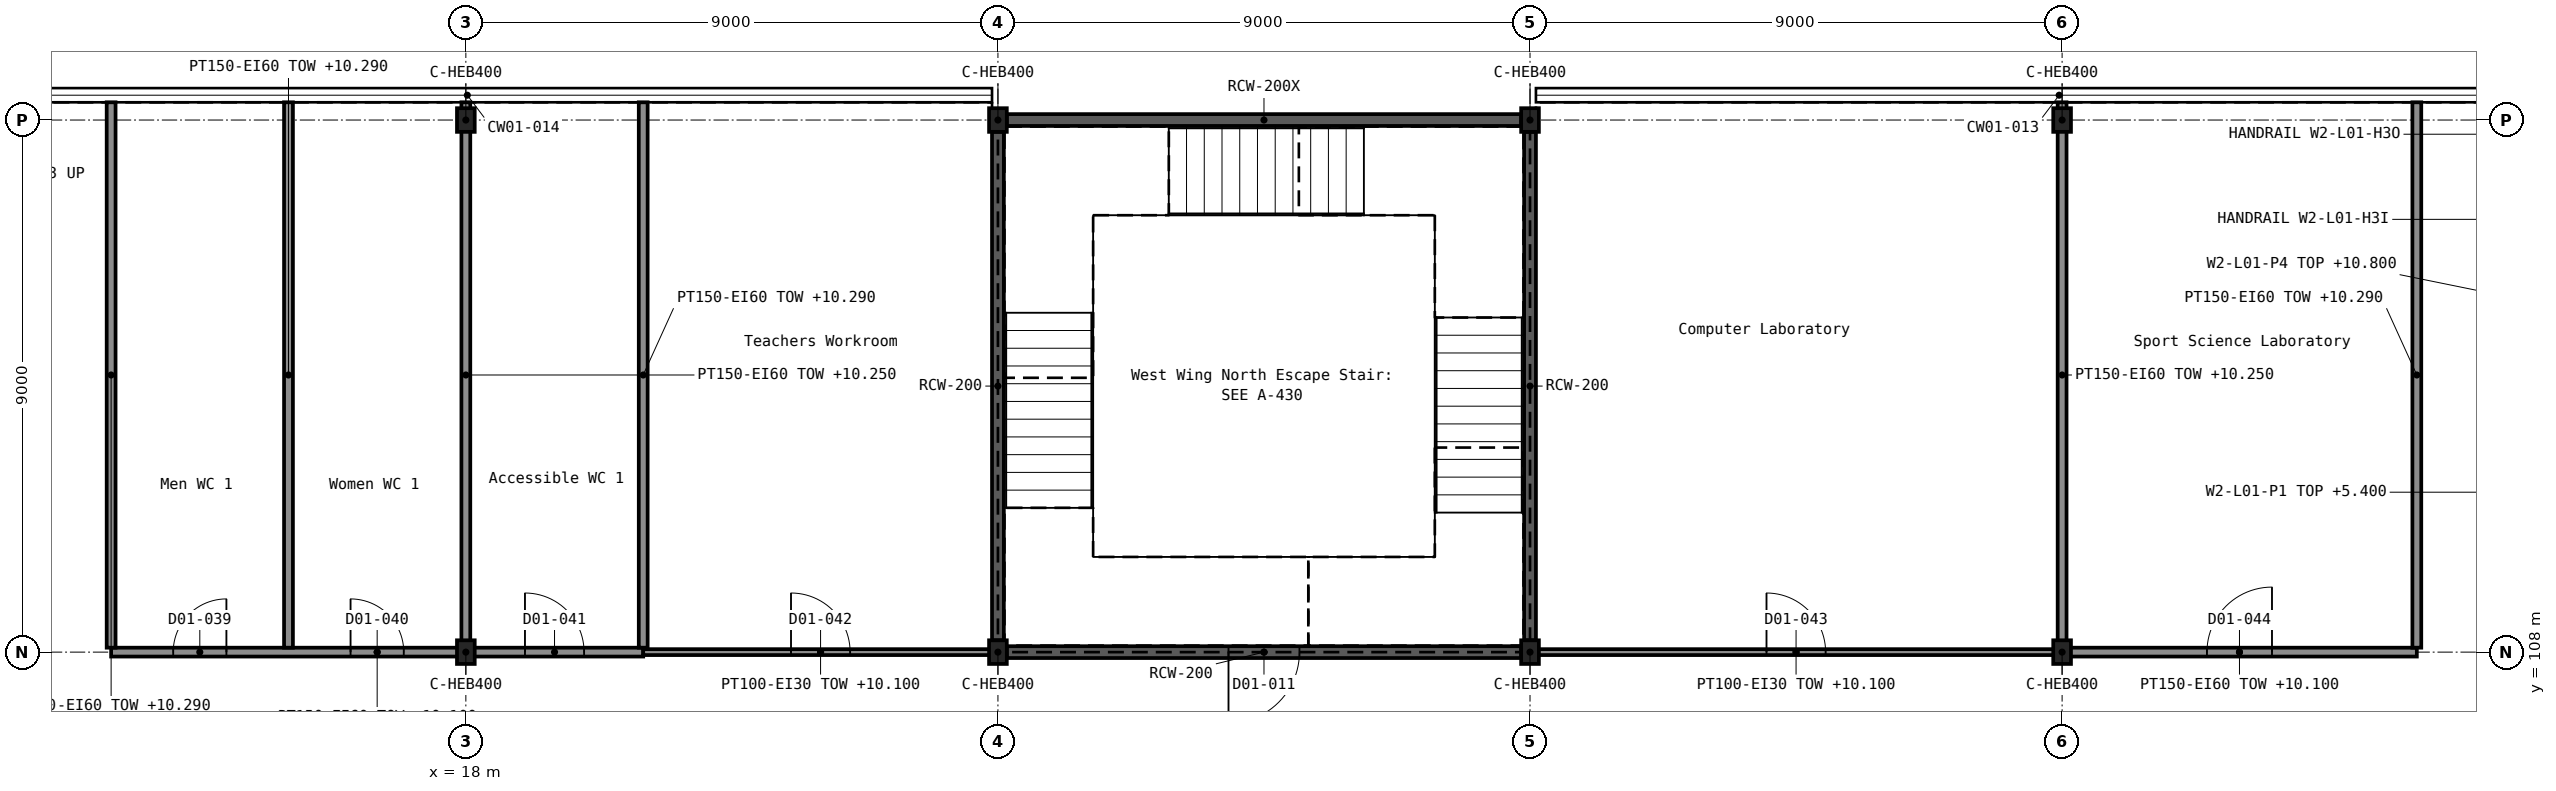
"""IFC4 building model, lengths in metres.
Left out: names, types, materials, properties, quantities, classifications, styles, units other than length and angle.
Written with IfcOpenShell. Run it as: python <this file> out.ifc"""

import sys

from ifc_helpers import new_model, si_unit, direction, frame, frame_2d, origin, origin_2d, place, context, subcontext, project, spatial, rectangle, i_section, extrude, element, fill, save


model = new_model("IFC4")
c1 = context("Model", 3, precision=1e-05, world=origin(), true_north=direction((0.0, 1.0)))
c2 = subcontext(c1, "Body", "Model", "MODEL_VIEW")
j1 = project(units=[si_unit("LENGTHUNIT", "METRE"), si_unit("PLANEANGLEUNIT", "RADIAN")], contexts=[c1])
p1 = place(None, origin())
s1 = spatial("IfcSite", under=j1, at=p1, CompositionType="ELEMENT")
p2 = place(p1, origin())
s2 = spatial("IfcBuilding", under=s1, at=p2, CompositionType="ELEMENT")
p3 = place(p2, frame((0.0, 0.0, 5.4)))
s3 = spatial("IfcBuildingStorey", under=s2, at=p3, CompositionType="ELEMENT", Elevation=5.4)
for number, where, z_axis, x_axis in (
    (1, (18.0, 108.0, 0.0), (0.0, 0.0, 1.0), (1.0, 0.0, 0.0)),
    (2, (27.0, 108.0, 0.0), (0.0, 0.0, 1.0), (1.0, 0.0, 0.0)),
    (3, (36.0, 108.0, 0.0), (0.0, 0.0, 1.0), (1.0, 0.0, 0.0)),
    (4, (45.0, 108.0, 0.0), (0.0, 0.0, 1.0), (1.0, 0.0, 0.0)),
    (5, (18.0, 117.0, 0.0), (0.0, 0.0, 1.0), (1.0, 0.0, 0.0)),
    (6, (27.0, 117.0, 0.0), (0.0, 0.0, 1.0), (1.0, 0.0, 0.0)),
    (7, (36.0, 117.0, 0.0), (0.0, 0.0, 1.0), (1.0, 0.0, 0.0)),
    (8, (45.0, 117.0, 0.0), (0.0, 0.0, 1.0), (1.0, 0.0, 0.0)),
):
    element("IfcColumn", number, at=place(p3, frame(where, z_axis=z_axis, x_axis=x_axis)), inside=s3, PredefinedType="COLUMN", context=c2, shape_type="SweptSolid", body=[
        extrude(i_section(OverallWidth=0.3, OverallDepth=0.4, WebThickness=0.013, FlangeThickness=0.024, FilletRadius=0.027, at=origin_2d()), origin(), (0.0, 0.0, 1.0), 5.4),
    ])
p4 = place(p3, frame((27.15, 108.0, 0.0), z_axis=(0.0, 0.0, 1.0), x_axis=(1.0, 0.0, 0.0)))
e9 = element("IfcWall", 9, at=p4, inside=s3, PredefinedType="SHEAR", context=c2, shape_type="SweptSolid", body=[
    extrude(rectangle(XDim=8.7, YDim=0.2, at=frame_2d((4.35, 0.0))), origin(), (0.0, 0.0, 1.0), 5.4),
])
p5 = place(p4, frame((3.75, 0.0, 0.0)))
e10 = element("IfcOpeningElement", 10, at=p5, cuts=e9, PredefinedType="OPENING", context=c2, shape_type="SweptSolid", body=[
    extrude(rectangle(XDim=1.2, YDim=2.1, at=frame_2d((0.6, 1.05))), frame((0.0, 0.111, 0.0), z_axis=(0.0, -1.0, 0.0), x_axis=(1.0, 0.0, 0.0)), (0.0, 0.0, 1.0), 0.222),
])
p6 = place(p3, frame((27.15, 117.0, 0.0), z_axis=(0.0, 0.0, 1.0), x_axis=(1.0, 0.0, 0.0)))
e11 = element("IfcWall", 11, at=p6, inside=s3, PredefinedType="SHEAR", context=c2, shape_type="SweptSolid", body=[
    extrude(rectangle(XDim=8.7, YDim=0.2, at=frame_2d((4.35, 0.0))), origin(), (0.0, 0.0, 1.0), 5.4),
])
for number, where, z_axis, x_axis in (
    (12, (27.0, 108.2, 0.0), (0.0, 0.0, 1.0), (0.0, 1.0, 0.0)),
    (13, (36.0, 108.2, 0.0), (0.0, 0.0, 1.0), (0.0, 1.0, 0.0)),
):
    element("IfcWall", number, at=place(p3, frame(where, z_axis=z_axis, x_axis=x_axis)), inside=s3, PredefinedType="SHEAR", context=c2, shape_type="SweptSolid", body=[
        extrude(rectangle(XDim=8.6, YDim=0.2, at=frame_2d((4.3, 0.0))), origin(), (0.0, 0.0, 1.0), 5.4),
    ])
p7 = place(p3, frame((12.0, 108.0, 0.0), z_axis=(0.0, 0.0, 1.0), x_axis=(1.0, 0.0, 0.0)))
e14 = element("IfcWall", 14, at=p7, inside=s3, PredefinedType="PARTITIONING", context=c2, shape_type="SweptSolid", body=[
    extrude(rectangle(XDim=9.0, YDim=0.15, at=frame_2d((4.5, 0.0))), origin(), (0.0, 0.0, 1.0), 4.7),
])
p8 = place(p7, frame((1.05, 0.0, 0.0)))
e15 = element("IfcOpeningElement", 15, at=p8, cuts=e14, PredefinedType="OPENING", context=c2, shape_type="SweptSolid", body=[
    extrude(rectangle(XDim=0.9, YDim=2.1, at=frame_2d((0.45, 1.05))), frame((0.0, 0.086, 0.0), z_axis=(0.0, -1.0, 0.0), x_axis=(1.0, 0.0, 0.0)), (0.0, 0.0, 1.0), 0.172),
])
p9 = place(p7, frame((4.05, 0.0, 0.0)))
e16 = element("IfcOpeningElement", 16, at=p9, cuts=e14, PredefinedType="OPENING", context=c2, shape_type="SweptSolid", body=[
    extrude(rectangle(XDim=0.9, YDim=2.1, at=frame_2d((0.45, 1.05))), frame((0.0, 0.086, 0.0), z_axis=(0.0, -1.0, 0.0), x_axis=(1.0, 0.0, 0.0)), (0.0, 0.0, 1.0), 0.172),
])
p10 = place(p7, frame((7.0, 0.0, 0.0)))
e17 = element("IfcOpeningElement", 17, at=p10, cuts=e14, PredefinedType="OPENING", context=c2, shape_type="SweptSolid", body=[
    extrude(rectangle(XDim=1.0, YDim=2.1, at=frame_2d((0.5, 1.05))), frame((0.0, 0.086, 0.0), z_axis=(0.0, -1.0, 0.0), x_axis=(1.0, 0.0, 0.0)), (0.0, 0.0, 1.0), 0.172),
])
p11 = place(p3, frame((45.0, 108.0, 0.0), z_axis=(0.0, 0.0, 1.0), x_axis=(1.0, 0.0, 0.0)))
e18 = element("IfcWall", 18, at=p11, inside=s3, PredefinedType="PARTITIONING", context=c2, shape_type="SweptSolid", body=[
    extrude(rectangle(XDim=6.0, YDim=0.15, at=frame_2d((3.0, 0.0))), origin(), (0.0, 0.0, 1.0), 4.7),
])
p12 = place(p11, frame((2.45, 0.0, 0.0)))
e19 = element("IfcOpeningElement", 19, at=p12, cuts=e18, PredefinedType="OPENING", context=c2, shape_type="SweptSolid", body=[
    extrude(rectangle(XDim=1.1, YDim=2.1, at=frame_2d((0.55, 1.05))), frame((0.0, 0.086, 0.0), z_axis=(0.0, -1.0, 0.0), x_axis=(1.0, 0.0, 0.0)), (0.0, 0.0, 1.0), 0.172),
])
for number, where, z_axis, x_axis in (
    (20, (12.0, 108.075, 0.0), (0.0, 0.0, 1.0), (0.0, 1.0, 0.0)),
    (21, (15.0, 108.075, 0.0), (0.0, 0.0, 1.0), (0.0, 1.0, 0.0)),
):
    element("IfcWall", number, at=place(p3, frame(where, z_axis=z_axis, x_axis=x_axis)), inside=s3, PredefinedType="PARTITIONING", context=c2, shape_type="SweptSolid", body=[
        extrude(rectangle(XDim=9.225, YDim=0.15, at=frame_2d((4.613, 0.0))), origin(), (0.0, 0.0, 1.0), 4.89),
    ])
p13 = place(p3, frame((18.0, 108.075, 0.0), z_axis=(0.0, 0.0, 1.0), x_axis=(0.0, 1.0, 0.0)))
e22 = element("IfcWall", 22, at=p13, inside=s3, PredefinedType="PARTITIONING", context=c2, shape_type="SweptSolid", body=[
    extrude(rectangle(XDim=9.225, YDim=0.15, at=frame_2d((4.613, 0.0))), origin(), (0.0, 0.0, 1.0), 4.85),
])
p14 = place(p3, frame((21.0, 108.075, 0.0), z_axis=(0.0, 0.0, 1.0), x_axis=(0.0, 1.0, 0.0)))
e23 = element("IfcWall", 23, at=p14, inside=s3, PredefinedType="PARTITIONING", context=c2, shape_type="SweptSolid", body=[
    extrude(rectangle(XDim=9.225, YDim=0.15, at=frame_2d((4.613, 0.0))), origin(), (0.0, 0.0, 1.0), 4.89),
])
p15 = place(p3, frame((45.0, 108.075, 0.0), z_axis=(0.0, 0.0, 1.0), x_axis=(0.0, 1.0, 0.0)))
e24 = element("IfcWall", 24, at=p15, inside=s3, PredefinedType="PARTITIONING", context=c2, shape_type="SweptSolid", body=[
    extrude(rectangle(XDim=9.225, YDim=0.15, at=frame_2d((4.613, 0.0))), origin(), (0.0, 0.0, 1.0), 4.85),
])
p16 = place(p3, frame((51.0, 108.075, 0.0), z_axis=(0.0, 0.0, 1.0), x_axis=(0.0, 1.0, 0.0)))
e25 = element("IfcWall", 25, at=p16, inside=s3, PredefinedType="PARTITIONING", context=c2, shape_type="SweptSolid", body=[
    extrude(rectangle(XDim=9.225, YDim=0.15, at=frame_2d((4.613, 0.0))), origin(), (0.0, 0.0, 1.0), 4.89),
])
p17 = place(p3, frame((21.0, 108.0, 0.0), z_axis=(0.0, 0.0, 1.0), x_axis=(1.0, 0.0, 0.0)))
e26 = element("IfcWall", 26, at=p17, inside=s3, PredefinedType="PARTITIONING", context=c2, shape_type="SweptSolid", body=[
    extrude(rectangle(XDim=6.0, YDim=0.1, at=frame_2d((3.0, 0.0))), origin(), (0.0, 0.0, 1.0), 4.7),
])
p18 = place(p17, frame((2.5, 0.0, 0.0)))
e27 = element("IfcOpeningElement", 27, at=p18, cuts=e26, PredefinedType="OPENING", context=c2, shape_type="SweptSolid", body=[
    extrude(rectangle(XDim=1.0, YDim=2.1, at=frame_2d((0.5, 1.05))), frame((0.0, 0.061, 0.0), z_axis=(0.0, -1.0, 0.0), x_axis=(1.0, 0.0, 0.0)), (0.0, 0.0, 1.0), 0.122),
])
p19 = place(p3, frame((36.0, 108.0, 0.0), z_axis=(0.0, 0.0, 1.0), x_axis=(1.0, 0.0, 0.0)))
e28 = element("IfcWall", 28, at=p19, inside=s3, PredefinedType="PARTITIONING", context=c2, shape_type="SweptSolid", body=[
    extrude(rectangle(XDim=9.0, YDim=0.1, at=frame_2d((4.5, 0.0))), origin(), (0.0, 0.0, 1.0), 4.7),
])
p20 = place(p19, frame((4.0, 0.0, 0.0)))
e29 = element("IfcOpeningElement", 29, at=p20, cuts=e28, PredefinedType="OPENING", context=c2, shape_type="SweptSolid", body=[
    extrude(rectangle(XDim=1.0, YDim=2.1, at=frame_2d((0.5, 1.05))), frame((0.0, 0.061, 0.0), z_axis=(0.0, -1.0, 0.0), x_axis=(1.0, 0.0, 0.0)), (0.0, 0.0, 1.0), 0.122),
])
p21 = place(p5, frame((1.2, 0.0, 0.0), z_axis=(0.0, 0.0, 1.0), x_axis=(-1.0, 0.0, 0.0)))
e30 = element("IfcDoor", 30, at=p21, inside=s3, OperationType="SINGLE_SWING_RIGHT", PredefinedType="DOOR", context=c2, shape_type="SweptSolid", body=[
    extrude(rectangle(XDim=1.2, YDim=2.1, at=frame_2d((0.6, 1.05))), frame((0.0, 0.025, 0.0), z_axis=(0.0, -1.0, 0.0), x_axis=(1.0, 0.0, 0.0)), (0.0, 0.0, 1.0), 0.05),
])
fill(e10, e30)
p22 = place(p8, origin())
e31 = element("IfcDoor", 31, at=p22, inside=s3, OperationType="SINGLE_SWING_RIGHT", PredefinedType="DOOR", context=c2, shape_type="SweptSolid", body=[
    extrude(rectangle(XDim=0.9, YDim=2.1, at=frame_2d((0.45, 1.05))), frame((0.0, 0.025, 0.0), z_axis=(0.0, -1.0, 0.0), x_axis=(1.0, 0.0, 0.0)), (0.0, 0.0, 1.0), 0.05),
])
fill(e15, e31)
p23 = place(p9, origin())
e32 = element("IfcDoor", 32, at=p23, inside=s3, OperationType="SINGLE_SWING_LEFT", PredefinedType="DOOR", context=c2, shape_type="SweptSolid", body=[
    extrude(rectangle(XDim=0.9, YDim=2.1, at=frame_2d((0.45, 1.05))), frame((0.0, 0.025, 0.0), z_axis=(0.0, -1.0, 0.0), x_axis=(1.0, 0.0, 0.0)), (0.0, 0.0, 1.0), 0.05),
])
fill(e16, e32)
p24 = place(p10, origin())
e33 = element("IfcDoor", 33, at=p24, inside=s3, OperationType="SINGLE_SWING_LEFT", PredefinedType="DOOR", context=c2, shape_type="SweptSolid", body=[
    extrude(rectangle(XDim=1.0, YDim=2.1, at=frame_2d((0.5, 1.05))), frame((0.0, 0.025, 0.0), z_axis=(0.0, -1.0, 0.0), x_axis=(1.0, 0.0, 0.0)), (0.0, 0.0, 1.0), 0.05),
])
fill(e17, e33)
p25 = place(p18, origin())
e34 = element("IfcDoor", 34, at=p25, inside=s3, OperationType="SINGLE_SWING_LEFT", PredefinedType="DOOR", context=c2, shape_type="SweptSolid", body=[
    extrude(rectangle(XDim=1.0, YDim=2.1, at=frame_2d((0.5, 1.05))), frame((0.0, 0.025, 0.0), z_axis=(0.0, -1.0, 0.0), x_axis=(1.0, 0.0, 0.0)), (0.0, 0.0, 1.0), 0.05),
])
fill(e27, e34)
p26 = place(p20, origin())
e35 = element("IfcDoor", 35, at=p26, inside=s3, OperationType="SINGLE_SWING_LEFT", PredefinedType="DOOR", context=c2, shape_type="SweptSolid", body=[
    extrude(rectangle(XDim=1.0, YDim=2.1, at=frame_2d((0.5, 1.05))), frame((0.0, 0.025, 0.0), z_axis=(0.0, -1.0, 0.0), x_axis=(1.0, 0.0, 0.0)), (0.0, 0.0, 1.0), 0.05),
])
fill(e29, e35)
p27 = place(p12, origin())
e36 = element("IfcDoor", 36, at=p27, inside=s3, OperationType="SINGLE_SWING_RIGHT", PredefinedType="DOOR", context=c2, shape_type="SweptSolid", body=[
    extrude(rectangle(XDim=1.1, YDim=2.1, at=frame_2d((0.55, 1.05))), frame((0.0, 0.025, 0.0), z_axis=(0.0, -1.0, 0.0), x_axis=(1.0, 0.0, 0.0)), (0.0, 0.0, 1.0), 0.05),
])
fill(e19, e36)
save(model, sys.argv[1])
